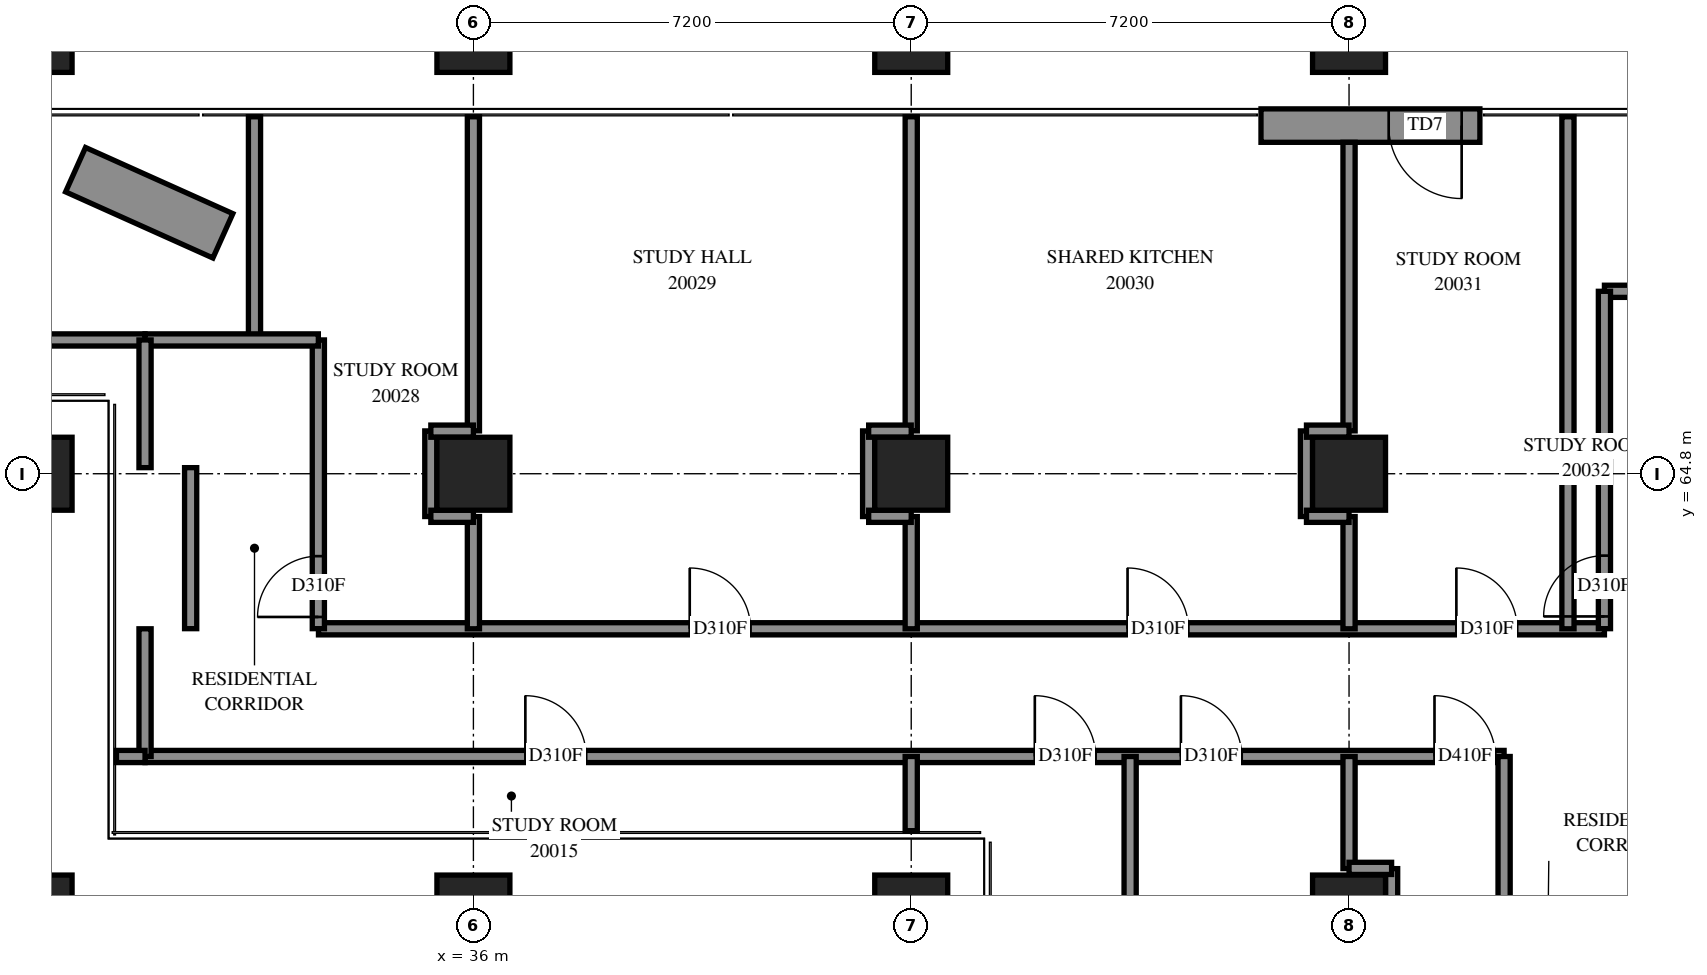
"""IFC4 building model, lengths in metres.
Left out: names, types, materials, properties, quantities, classifications, styles, units other than length and angle.
Written with IfcOpenShell. Run it as: python <this file> out.ifc"""

import sys

from ifc_helpers import new_model, si_unit, direction, frame, frame_2d, origin, origin_2d, place, context, subcontext, project, spatial, rectangle, extrude, element, fill, save


model = new_model("IFC4")
c1 = context("Model", 3, precision=1e-05, world=origin(), true_north=direction((0.0, 1.0)))
c2 = subcontext(c1, "Body", "Model", "MODEL_VIEW")
j1 = project(units=[si_unit("LENGTHUNIT", "METRE"), si_unit("PLANEANGLEUNIT", "RADIAN")], contexts=[c1])
p1 = place(None, origin())
s1 = spatial("IfcSite", under=j1, at=p1, CompositionType="ELEMENT")
p2 = place(p1, origin())
s2 = spatial("IfcBuilding", under=s1, at=p2, CompositionType="ELEMENT")
p3 = place(p2, frame((0.0, 0.0, 77.0)))
s3 = spatial("IfcBuildingStorey", under=s2, at=p3, CompositionType="ELEMENT", Elevation=77.0)
for number, where, z_axis, x_axis in (
    (1, (28.8, 57.6, 0.0), (0.0, 0.0, 1.0), (1.0, 0.0, 0.0)),
    (2, (28.8, 64.8, 0.0), (0.0, 0.0, 1.0), (1.0, 0.0, 0.0)),
    (3, (28.8, 72.0, 0.0), (0.0, 0.0, 1.0), (1.0, 0.0, 0.0)),
    (4, (36.0, 57.6, 0.0), (0.0, 0.0, 1.0), (1.0, 0.0, 0.0)),
    (5, (36.0, 64.8, 0.0), (0.0, 0.0, 1.0), (1.0, 0.0, 0.0)),
    (6, (36.0, 72.0, 0.0), (0.0, 0.0, 1.0), (1.0, 0.0, 0.0)),
    (7, (43.2, 57.6, 0.0), (0.0, 0.0, 1.0), (1.0, 0.0, 0.0)),
    (8, (43.2, 64.8, 0.0), (0.0, 0.0, 1.0), (1.0, 0.0, 0.0)),
    (9, (43.2, 72.0, 0.0), (0.0, 0.0, 1.0), (1.0, 0.0, 0.0)),
    (10, (50.4, 57.6, 0.0), (0.0, 0.0, 1.0), (1.0, 0.0, 0.0)),
    (11, (50.4, 64.8, 0.0), (0.0, 0.0, 1.0), (1.0, 0.0, 0.0)),
    (12, (50.4, 72.0, 0.0), (0.0, 0.0, 1.0), (1.0, 0.0, 0.0)),
):
    element("IfcColumn", number, at=place(p3, frame(where, z_axis=z_axis, x_axis=x_axis)), inside=s3, PredefinedType="COLUMN", context=c2, shape_type="SweptSolid", body=[
        extrude(rectangle(XDim=1.2, YDim=1.2, at=origin_2d()), origin(), (0.0, 0.0, 1.0), 3.9),
    ])
p4 = place(p3, frame((52.552, 70.525, 0.0), z_axis=(0.0, 0.0, 1.0), x_axis=(-1.0, 0.0, 0.0)))
e13 = element("IfcWall", 13, at=p4, inside=s3, PredefinedType="SOLIDWALL", context=c2, shape_type="SweptSolid", body=[
    extrude(rectangle(XDim=3.6, YDim=0.55, at=frame_2d((1.8, 0.0))), origin(), (0.0, 0.0, 1.0), 3.9),
])
p5 = place(p4, frame((0.3, 0.0, 0.0)))
e14 = element("IfcOpeningElement", 14, at=p5, cuts=e13, PredefinedType="OPENING", context=c2, shape_type="SweptSolid", body=[
    extrude(rectangle(XDim=1.2, YDim=2.4, at=frame_2d((0.6, 1.2))), frame((0.0, 0.285, 0.0), z_axis=(0.0, -1.0, 0.0), x_axis=(1.0, 0.0, 0.0)), (0.0, 0.0, 1.0), 0.57),
])
p6 = place(p3, frame((31.88, 68.712, 0.0), z_axis=(0.0, 0.0, 1.0), x_axis=(-0.912289633, 0.4095456329, 0.0)))
e15 = element("IfcWall", 15, at=p6, inside=s3, PredefinedType="SOLIDWALL", context=c2, shape_type="SweptSolid", body=[
    extrude(rectangle(XDim=2.656, YDim=0.8, at=frame_2d((1.328, 0.0))), origin(), (0.0, 0.0, 1.0), 0.65),
])
p7 = place(p3, frame((30.6, 60.15, 0.0), z_axis=(0.0, 0.0, 1.0), x_axis=(1.0, 0.0, 0.0)))
e16 = element("IfcWall", 16, at=p7, inside=s3, PredefinedType="PARTITIONING", context=c2, shape_type="SweptSolid", body=[
    extrude(rectangle(XDim=22.35, YDim=0.2, at=frame_2d((11.175, 0.0))), origin(), (0.0, 0.0, 1.0), 3.9),
])
p8 = place(p7, frame((6.254, 0.0, 0.0)))
e17 = element("IfcOpeningElement", 17, at=p8, cuts=e16, PredefinedType="OPENING", context=c2, shape_type="SweptSolid", body=[
    extrude(rectangle(XDim=1.0, YDim=2.1, at=frame_2d((0.5, 1.05))), frame((0.0, 0.11, 0.0), z_axis=(0.0, -1.0, 0.0), x_axis=(1.0, 0.0, 0.0)), (0.0, 0.0, 1.0), 0.22),
])
p9 = place(p7, frame((14.633, 0.0, 0.0)))
e18 = element("IfcOpeningElement", 18, at=p9, cuts=e16, PredefinedType="OPENING", context=c2, shape_type="SweptSolid", body=[
    extrude(rectangle(XDim=1.0, YDim=2.1, at=frame_2d((0.5, 1.05))), frame((0.0, 0.11, 0.0), z_axis=(0.0, -1.0, 0.0), x_axis=(1.0, 0.0, 0.0)), (0.0, 0.0, 1.0), 0.22),
])
p10 = place(p7, frame((17.035, 0.0, 0.0)))
e19 = element("IfcOpeningElement", 19, at=p10, cuts=e16, PredefinedType="OPENING", context=c2, shape_type="SweptSolid", body=[
    extrude(rectangle(XDim=1.0, YDim=2.1, at=frame_2d((0.5, 1.05))), frame((0.0, 0.11, 0.0), z_axis=(0.0, -1.0, 0.0), x_axis=(1.0, 0.0, 0.0)), (0.0, 0.0, 1.0), 0.22),
])
p11 = place(p7, frame((21.205, 0.0, 0.0)))
e20 = element("IfcOpeningElement", 20, at=p11, cuts=e16, PredefinedType="OPENING", context=c2, shape_type="SweptSolid", body=[
    extrude(rectangle(XDim=1.0, YDim=2.1, at=frame_2d((0.5, 1.05))), frame((0.0, 0.11, 0.0), z_axis=(0.0, -1.0, 0.0), x_axis=(1.0, 0.0, 0.0)), (0.0, 0.0, 1.0), 0.22),
])
p12 = place(p3, frame((33.452, 62.25, 0.0), z_axis=(0.0, 0.0, 1.0), x_axis=(1.0, 0.0, 0.0)))
e21 = element("IfcWall", 21, at=p12, inside=s3, PredefinedType="PARTITIONING", context=c2, shape_type="SweptSolid", body=[
    extrude(rectangle(XDim=21.148, YDim=0.2, at=frame_2d((10.574, 0.0))), origin(), (0.0, 0.0, 1.0), 3.9),
])
p13 = place(p12, frame((6.106, 0.0, 0.0)))
e22 = element("IfcOpeningElement", 22, at=p13, cuts=e21, PredefinedType="OPENING", context=c2, shape_type="SweptSolid", body=[
    extrude(rectangle(XDim=1.0, YDim=2.1, at=frame_2d((0.5, 1.05))), frame((0.0, 0.11, 0.0), z_axis=(0.0, -1.0, 0.0), x_axis=(1.0, 0.0, 0.0)), (0.0, 0.0, 1.0), 0.22),
])
p14 = place(p12, frame((13.306, 0.0, 0.0)))
e23 = element("IfcOpeningElement", 23, at=p14, cuts=e21, PredefinedType="OPENING", context=c2, shape_type="SweptSolid", body=[
    extrude(rectangle(XDim=1.0, YDim=2.1, at=frame_2d((0.5, 1.05))), frame((0.0, 0.11, 0.0), z_axis=(0.0, -1.0, 0.0), x_axis=(1.0, 0.0, 0.0)), (0.0, 0.0, 1.0), 0.22),
])
p15 = place(p12, frame((18.713, 0.0, 0.0)))
e24 = element("IfcOpeningElement", 24, at=p15, cuts=e21, PredefinedType="OPENING", context=c2, shape_type="SweptSolid", body=[
    extrude(rectangle(XDim=1.0, YDim=2.1, at=frame_2d((0.5, 1.05))), frame((0.0, 0.11, 0.0), z_axis=(0.0, -1.0, 0.0), x_axis=(1.0, 0.0, 0.0)), (0.0, 0.0, 1.0), 0.22),
])
p16 = place(p3, frame((54.6, 67.8, 0.0), z_axis=(0.0, 0.0, 1.0), x_axis=(1.0, 0.0, 0.0)))
e25 = element("IfcWall", 25, at=p16, inside=s3, PredefinedType="PARTITIONING", context=c2, shape_type="SweptSolid", body=[
    extrude(rectangle(XDim=20.4, YDim=0.2, at=frame_2d((10.2, 0.0))), origin(), (0.0, 0.0, 1.0), 3.9),
])
p17 = place(p16, frame((19.257, 0.0, 0.0)))
e26 = element("IfcOpeningElement", 26, at=p17, cuts=e25, PredefinedType="OPENING", context=c2, shape_type="SweptSolid", body=[
    extrude(rectangle(XDim=1.0, YDim=2.1, at=frame_2d((0.5, 1.05))), frame((0.0, 0.11, 0.0), z_axis=(0.0, -1.0, 0.0), x_axis=(1.0, 0.0, 0.0)), (0.0, 0.0, 1.0), 0.22),
])
p18 = place(p16, frame((5.093, 0.0, 0.0)))
e27 = element("IfcOpeningElement", 27, at=p18, cuts=e25, PredefinedType="OPENING", context=c2, shape_type="SweptSolid", body=[
    extrude(rectangle(XDim=1.0, YDim=2.1, at=frame_2d((0.5, 1.05))), frame((0.0, 0.11, 0.0), z_axis=(0.0, -1.0, 0.0), x_axis=(1.0, 0.0, 0.0)), (0.0, 0.0, 1.0), 0.22),
])
p19 = place(p16, frame((7.168, 0.0, 0.0)))
e28 = element("IfcOpeningElement", 28, at=p19, cuts=e25, PredefinedType="OPENING", context=c2, shape_type="SweptSolid", body=[
    extrude(rectangle(XDim=1.0, YDim=2.1, at=frame_2d((0.5, 1.05))), frame((0.0, 0.11, 0.0), z_axis=(0.0, -1.0, 0.0), x_axis=(1.0, 0.0, 0.0)), (0.0, 0.0, 1.0), 0.22),
])
p20 = place(p16, frame((12.293, 0.0, 0.0)))
e29 = element("IfcOpeningElement", 29, at=p20, cuts=e25, PredefinedType="OPENING", context=c2, shape_type="SweptSolid", body=[
    extrude(rectangle(XDim=1.0, YDim=2.1, at=frame_2d((0.5, 1.05))), frame((0.0, 0.11, 0.0), z_axis=(0.0, -1.0, 0.0), x_axis=(1.0, 0.0, 0.0)), (0.0, 0.0, 1.0), 0.22),
])
p21 = place(p16, frame((14.367, 0.0, 0.0)))
e30 = element("IfcOpeningElement", 30, at=p21, cuts=e25, PredefinedType="OPENING", context=c2, shape_type="SweptSolid", body=[
    extrude(rectangle(XDim=1.0, YDim=2.1, at=frame_2d((0.5, 1.05))), frame((0.0, 0.11, 0.0), z_axis=(0.0, -1.0, 0.0), x_axis=(1.0, 0.0, 0.0)), (0.0, 0.0, 1.0), 0.22),
])
for number, where, z_axis, x_axis in (
    (31, (46.8, 51.73, 0.0), (0.0, 0.0, 1.0), (0.0, 1.0, 0.0)),
    (32, (54.0, 62.25, 0.0), (0.0, 0.0, 1.0), (0.0, 1.0, 0.0)),
):
    element("IfcWall", number, at=place(p3, frame(where, z_axis=z_axis, x_axis=x_axis)), inside=s3, PredefinedType="PARTITIONING", context=c2, shape_type="SweptSolid", body=[
        extrude(rectangle(XDim=8.42, YDim=0.2, at=frame_2d((4.21, 0.0))), origin(), (0.0, 0.0, 1.0), 3.9),
    ])
p22 = place(p3, frame((22.93, 67.0, 0.0), z_axis=(0.0, 0.0, 1.0), x_axis=(1.0, 0.0, 0.0)))
e33 = element("IfcWall", 33, at=p22, inside=s3, PredefinedType="PARTITIONING", context=c2, shape_type="SweptSolid", body=[
    extrude(rectangle(XDim=7.67, YDim=0.2, at=frame_2d((3.835, 0.0))), origin(), (0.0, 0.0, 1.0), 3.9),
])
p23 = place(p3, frame((54.6, 62.252, 0.0), z_axis=(0.0, 0.0, 1.0), x_axis=(0.0, 1.0, 0.0)))
e34 = element("IfcWall", 34, at=p23, inside=s3, PredefinedType="PARTITIONING", context=c2, shape_type="SweptSolid", body=[
    extrude(rectangle(XDim=5.548, YDim=0.2, at=frame_2d((2.774, 0.0))), origin(), (0.0, 0.0, 1.0), 3.9),
])
p24 = place(p23, frame((0.201, 0.0, 0.0)))
e35 = element("IfcOpeningElement", 35, at=p24, cuts=e34, PredefinedType="OPENING", context=c2, shape_type="SweptSolid", body=[
    extrude(rectangle(XDim=1.0, YDim=2.1, at=frame_2d((0.5, 1.05))), frame((0.0, 0.11, 0.0), z_axis=(0.0, -1.0, 0.0), x_axis=(1.0, 0.0, 0.0)), (0.0, 0.0, 1.0), 0.22),
])
for number, where, z_axis, x_axis in (
    (36, (36.0, 65.504, 0.0), (0.0, 0.0, 1.0), (0.0, 1.0, 0.0)),
    (37, (43.2, 65.504, 0.0), (0.0, 0.0, 1.0), (0.0, 1.0, 0.0)),
):
    element("IfcWall", number, at=place(p3, frame(where, z_axis=z_axis, x_axis=x_axis)), inside=s3, PredefinedType="PARTITIONING", context=c2, shape_type="SweptSolid", body=[
        extrude(rectangle(XDim=5.166, YDim=0.2, at=frame_2d((2.583, 0.0))), origin(), (0.0, 0.0, 1.0), 3.9),
    ])
p25 = place(p3, frame((50.4, 65.504, 0.0), z_axis=(0.0, 0.0, 1.0), x_axis=(0.0, 1.0, 0.0)))
e38 = element("IfcWall", 38, at=p25, inside=s3, PredefinedType="PARTITIONING", context=c2, shape_type="SweptSolid", body=[
    extrude(rectangle(XDim=4.746, YDim=0.2, at=frame_2d((2.373, 0.0))), origin(), (0.0, 0.0, 1.0), 3.9),
])
p26 = place(p3, frame((52.95, 55.052, 0.0), z_axis=(0.0, 0.0, 1.0), x_axis=(0.0, 1.0, 0.0)))
e39 = element("IfcWall", 39, at=p26, inside=s3, PredefinedType="PARTITIONING", context=c2, shape_type="SweptSolid", body=[
    extrude(rectangle(XDim=5.098, YDim=0.2, at=frame_2d((2.549, 0.0))), origin(), (0.0, 0.0, 1.0), 3.9),
])
p27 = place(p3, frame((33.45, 62.252, 0.0), z_axis=(0.0, 0.0, 1.0), x_axis=(0.0, 1.0, 0.0)))
e40 = element("IfcWall", 40, at=p27, inside=s3, PredefinedType="PARTITIONING", context=c2, shape_type="SweptSolid", body=[
    extrude(rectangle(XDim=4.748, YDim=0.2, at=frame_2d((2.374, 0.0))), origin(), (0.0, 0.0, 1.0), 3.9),
])
p28 = place(p27, frame((0.193, 0.0, 0.0)))
e41 = element("IfcOpeningElement", 41, at=p28, cuts=e40, PredefinedType="OPENING", context=c2, shape_type="SweptSolid", body=[
    extrude(rectangle(XDim=1.0, YDim=2.1, at=frame_2d((0.5, 1.05))), frame((0.0, 0.11, 0.0), z_axis=(0.0, -1.0, 0.0), x_axis=(1.0, 0.0, 0.0)), (0.0, 0.0, 1.0), 0.22),
])
p29 = place(p3, frame((32.4, 67.0, 0.0), z_axis=(0.0, 0.0, 1.0), x_axis=(0.0, 1.0, 0.0)))
e42 = element("IfcWall", 42, at=p29, inside=s3, PredefinedType="PARTITIONING", context=c2, shape_type="SweptSolid", body=[
    extrude(rectangle(XDim=3.67, YDim=0.2, at=frame_2d((1.835, 0.0))), origin(), (0.0, 0.0, 1.0), 3.9),
])
p30 = place(p3, frame((30.6, 67.0, 0.0), z_axis=(0.0, 0.0, 1.0), x_axis=(1.0, 0.0, 0.0)))
e43 = element("IfcWall", 43, at=p30, inside=s3, PredefinedType="PARTITIONING", context=c2, shape_type="SweptSolid", body=[
    extrude(rectangle(XDim=2.85, YDim=0.2, at=frame_2d((1.425, 0.0))), origin(), (0.0, 0.0, 1.0), 3.9),
])
p31 = place(p3, frame((31.35, 62.252, 0.0), z_axis=(0.0, 0.0, 1.0), x_axis=(0.0, 1.0, 0.0)))
e44 = element("IfcWall", 44, at=p31, inside=s3, PredefinedType="PARTITIONING", context=c2, shape_type="SweptSolid", body=[
    extrude(rectangle(XDim=2.648, YDim=0.2, at=frame_2d((1.324, 0.0))), origin(), (0.0, 0.0, 1.0), 3.9),
])
for number, where, z_axis, x_axis in (
    (45, (30.6, 60.15, 0.0), (0.0, 0.0, 1.0), (0.0, 1.0, 0.0)),
    (46, (30.6, 64.9, 0.0), (0.0, 0.0, 1.0), (0.0, 1.0, 0.0)),
):
    element("IfcWall", number, at=place(p3, frame(where, z_axis=z_axis, x_axis=x_axis)), inside=s3, PredefinedType="PARTITIONING", context=c2, shape_type="SweptSolid", body=[
        extrude(rectangle(XDim=2.1, YDim=0.2, at=frame_2d((1.05, 0.0))), origin(), (0.0, 0.0, 1.0), 3.9),
    ])
for number, where, z_axis, x_axis in (
    (47, (36.0, 62.25, 0.0), (0.0, 0.0, 1.0), (0.0, 1.0, 0.0)),
    (48, (43.2, 62.25, 0.0), (0.0, 0.0, 1.0), (0.0, 1.0, 0.0)),
    (49, (50.4, 62.25, 0.0), (0.0, 0.0, 1.0), (0.0, 1.0, 0.0)),
):
    element("IfcWall", number, at=place(p3, frame(where, z_axis=z_axis, x_axis=x_axis)), inside=s3, PredefinedType="PARTITIONING", context=c2, shape_type="SweptSolid", body=[
        extrude(rectangle(XDim=1.846, YDim=0.2, at=frame_2d((0.923, 0.0))), origin(), (0.0, 0.0, 1.0), 3.9),
    ])
p32 = place(p3, frame((50.4, 58.306, 0.0), z_axis=(0.0, 0.0, 1.0), x_axis=(0.0, 1.0, 0.0)))
e50 = element("IfcWall", 50, at=p32, inside=s3, PredefinedType="PARTITIONING", context=c2, shape_type="SweptSolid", body=[
    extrude(rectangle(XDim=1.844, YDim=0.2, at=frame_2d((0.922, 0.0))), origin(), (0.0, 0.0, 1.0), 3.9),
])
p33 = place(p3, frame((51.1, 56.894, 0.0), z_axis=(0.0, 0.0, 1.0), x_axis=(0.0, 1.0, 0.0)))
e51 = element("IfcWall", 51, at=p33, inside=s3, PredefinedType="PARTITIONING", context=c2, shape_type="SweptSolid", body=[
    extrude(rectangle(XDim=1.412, YDim=0.2, at=frame_2d((0.706, 0.0))), origin(), (0.0, 0.0, 1.0), 3.9),
])
for number, where, z_axis, x_axis in (
    (52, (35.3, 64.096, 0.0), (0.0, 0.0, 1.0), (0.0, 1.0, 0.0)),
    (53, (42.5, 64.096, 0.0), (0.0, 0.0, 1.0), (0.0, 1.0, 0.0)),
    (54, (49.7, 64.096, 0.0), (0.0, 0.0, 1.0), (0.0, 1.0, 0.0)),
):
    element("IfcWall", number, at=place(p3, frame(where, z_axis=z_axis, x_axis=x_axis)), inside=s3, PredefinedType="PARTITIONING", context=c2, shape_type="SweptSolid", body=[
        extrude(rectangle(XDim=1.408, YDim=0.2, at=frame_2d((0.704, 0.0))), origin(), (0.0, 0.0, 1.0), 3.9),
    ])
p34 = place(p3, frame((43.2, 58.93, 0.0), z_axis=(0.0, 0.0, 1.0), x_axis=(0.0, 1.0, 0.0)))
e55 = element("IfcWall", 55, at=p34, inside=s3, PredefinedType="PARTITIONING", context=c2, shape_type="SweptSolid", body=[
    extrude(rectangle(XDim=1.22, YDim=0.2, at=frame_2d((0.61, 0.0))), origin(), (0.0, 0.0, 1.0), 3.9),
])
for number, where, z_axis, x_axis in (
    (56, (35.3, 65.5, 0.0), (0.0, 0.0, 1.0), (1.0, 0.0, 0.0)),
    (57, (42.5, 65.5, 0.0), (0.0, 0.0, 1.0), (1.0, 0.0, 0.0)),
    (58, (35.3, 64.1, 0.0), (0.0, 0.0, 1.0), (1.0, 0.0, 0.0)),
    (59, (42.5, 64.1, 0.0), (0.0, 0.0, 1.0), (1.0, 0.0, 0.0)),
    (60, (50.4, 58.31, 0.0), (0.0, 0.0, 1.0), (1.0, 0.0, 0.0)),
    (61, (49.7, 65.5, 0.0), (0.0, 0.0, 1.0), (1.0, 0.0, 0.0)),
    (62, (49.7, 64.1, 0.0), (0.0, 0.0, 1.0), (1.0, 0.0, 0.0)),
):
    element("IfcWall", number, at=place(p3, frame(where, z_axis=z_axis, x_axis=x_axis)), inside=s3, PredefinedType="PARTITIONING", context=c2, shape_type="SweptSolid", body=[
        extrude(rectangle(XDim=0.7, YDim=0.2, at=frame_2d((0.35, 0.0))), origin(), (0.0, 0.0, 1.0), 3.9),
    ])
p35 = place(p3, frame((30.13, 60.15, 0.0), z_axis=(0.0, 0.0, 1.0), x_axis=(1.0, 0.0, 0.0)))
e63 = element("IfcWall", 63, at=p35, inside=s3, PredefinedType="PARTITIONING", context=c2, shape_type="SweptSolid", body=[
    extrude(rectangle(XDim=0.47, YDim=0.2, at=frame_2d((0.235, 0.0))), origin(), (0.0, 0.0, 1.0), 3.9),
])
p36 = place(p5, origin())
e64 = element("IfcDoor", 64, at=p36, inside=s3, OperationType="SINGLE_SWING_LEFT", PredefinedType="DOOR", context=c2, shape_type="SweptSolid", body=[
    extrude(rectangle(XDim=1.2, YDim=2.4, at=frame_2d((0.6, 1.2))), frame((0.0, 0.025, 0.0), z_axis=(0.0, -1.0, 0.0), x_axis=(1.0, 0.0, 0.0)), (0.0, 0.0, 1.0), 0.05),
])
fill(e14, e64)
p37 = place(p8, origin())
e65 = element("IfcDoor", 65, at=p37, inside=s3, OperationType="SINGLE_SWING_LEFT", PredefinedType="DOOR", context=c2, shape_type="SweptSolid", body=[
    extrude(rectangle(XDim=1.0, YDim=2.1, at=frame_2d((0.5, 1.05))), frame((0.0, 0.025, 0.0), z_axis=(0.0, -1.0, 0.0), x_axis=(1.0, 0.0, 0.0)), (0.0, 0.0, 1.0), 0.05),
])
fill(e17, e65)
p38 = place(p9, origin())
e66 = element("IfcDoor", 66, at=p38, inside=s3, OperationType="SINGLE_SWING_LEFT", PredefinedType="DOOR", context=c2, shape_type="SweptSolid", body=[
    extrude(rectangle(XDim=1.0, YDim=2.1, at=frame_2d((0.5, 1.05))), frame((0.0, 0.025, 0.0), z_axis=(0.0, -1.0, 0.0), x_axis=(1.0, 0.0, 0.0)), (0.0, 0.0, 1.0), 0.05),
])
fill(e18, e66)
p39 = place(p10, origin())
e67 = element("IfcDoor", 67, at=p39, inside=s3, OperationType="SINGLE_SWING_RIGHT", PredefinedType="DOOR", context=c2, shape_type="SweptSolid", body=[
    extrude(rectangle(XDim=1.0, YDim=2.1, at=frame_2d((0.5, 1.05))), frame((0.0, 0.025, 0.0), z_axis=(0.0, -1.0, 0.0), x_axis=(1.0, 0.0, 0.0)), (0.0, 0.0, 1.0), 0.05),
])
fill(e19, e67)
p40 = place(p11, origin())
e68 = element("IfcDoor", 68, at=p40, inside=s3, OperationType="SINGLE_SWING_LEFT", PredefinedType="DOOR", context=c2, shape_type="SweptSolid", body=[
    extrude(rectangle(XDim=1.0, YDim=2.1, at=frame_2d((0.5, 1.05))), frame((0.0, 0.025, 0.0), z_axis=(0.0, -1.0, 0.0), x_axis=(1.0, 0.0, 0.0)), (0.0, 0.0, 1.0), 0.05),
])
fill(e20, e68)
p41 = place(p28, origin())
e69 = element("IfcDoor", 69, at=p41, inside=s3, OperationType="SINGLE_SWING_LEFT", PredefinedType="DOOR", context=c2, shape_type="SweptSolid", body=[
    extrude(rectangle(XDim=1.0, YDim=2.1, at=frame_2d((0.5, 1.05))), frame((0.0, 0.025, 0.0), z_axis=(0.0, -1.0, 0.0), x_axis=(1.0, 0.0, 0.0)), (0.0, 0.0, 1.0), 0.05),
])
fill(e41, e69)
p42 = place(p13, origin())
e70 = element("IfcDoor", 70, at=p42, inside=s3, OperationType="SINGLE_SWING_RIGHT", PredefinedType="DOOR", context=c2, shape_type="SweptSolid", body=[
    extrude(rectangle(XDim=1.0, YDim=2.1, at=frame_2d((0.5, 1.05))), frame((0.0, 0.025, 0.0), z_axis=(0.0, -1.0, 0.0), x_axis=(1.0, 0.0, 0.0)), (0.0, 0.0, 1.0), 0.05),
])
fill(e22, e70)
p43 = place(p14, origin())
e71 = element("IfcDoor", 71, at=p43, inside=s3, OperationType="SINGLE_SWING_RIGHT", PredefinedType="DOOR", context=c2, shape_type="SweptSolid", body=[
    extrude(rectangle(XDim=1.0, YDim=2.1, at=frame_2d((0.5, 1.05))), frame((0.0, 0.025, 0.0), z_axis=(0.0, -1.0, 0.0), x_axis=(1.0, 0.0, 0.0)), (0.0, 0.0, 1.0), 0.05),
])
fill(e23, e71)
p44 = place(p15, origin())
e72 = element("IfcDoor", 72, at=p44, inside=s3, OperationType="SINGLE_SWING_RIGHT", PredefinedType="DOOR", context=c2, shape_type="SweptSolid", body=[
    extrude(rectangle(XDim=1.0, YDim=2.1, at=frame_2d((0.5, 1.05))), frame((0.0, 0.025, 0.0), z_axis=(0.0, -1.0, 0.0), x_axis=(1.0, 0.0, 0.0)), (0.0, 0.0, 1.0), 0.05),
])
fill(e24, e72)
p45 = place(p24, origin())
e73 = element("IfcDoor", 73, at=p45, inside=s3, OperationType="SINGLE_SWING_LEFT", PredefinedType="DOOR", context=c2, shape_type="SweptSolid", body=[
    extrude(rectangle(XDim=1.0, YDim=2.1, at=frame_2d((0.5, 1.05))), frame((0.0, 0.025, 0.0), z_axis=(0.0, -1.0, 0.0), x_axis=(1.0, 0.0, 0.0)), (0.0, 0.0, 1.0), 0.05),
])
fill(e35, e73)
save(model, sys.argv[1])
